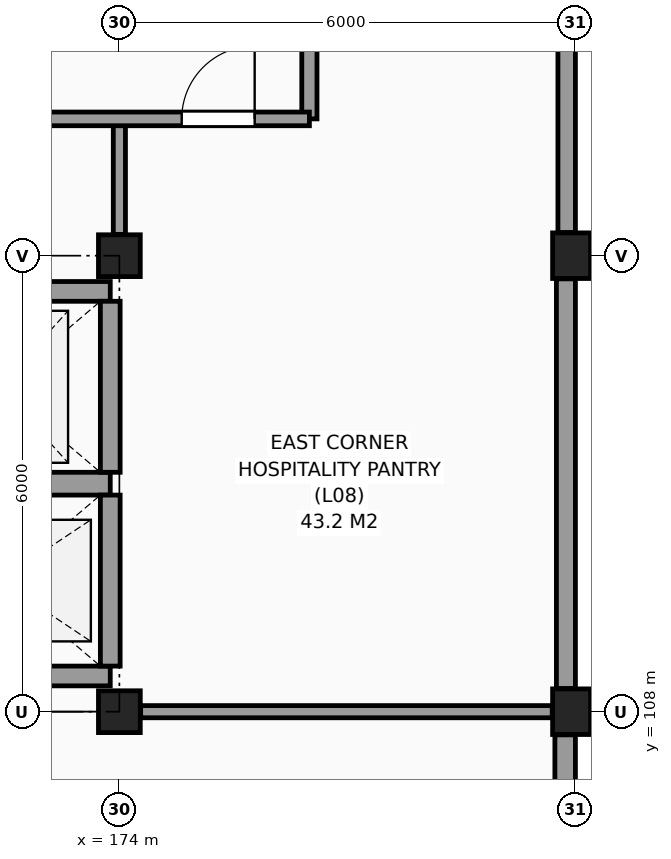
"""IFC4 building model, lengths in metres.
Left out: names, types, materials, properties, quantities, classifications, styles, units other than length and angle.
Written with IfcOpenShell. Run it as: python <this file> out.ifc"""

import sys

from ifc_helpers import new_model, si_unit, direction, frame, frame_2d, origin, origin_2d, place, context, subcontext, project, spatial, rectangle, extrude, element, fill, save


model = new_model("IFC4")
c1 = context("Model", 3, precision=1e-05, world=origin(), true_north=direction((0.0, 1.0)))
c2 = subcontext(c1, "Body", "Model", "MODEL_VIEW")
j1 = project(units=[si_unit("LENGTHUNIT", "METRE"), si_unit("PLANEANGLEUNIT", "RADIAN")], contexts=[c1])
p1 = place(None, origin())
s1 = spatial("IfcSite", under=j1, at=p1, CompositionType="ELEMENT")
p2 = place(p1, origin())
s2 = spatial("IfcBuilding", under=s1, at=p2, CompositionType="ELEMENT")
p3 = place(p2, frame((0.0, 0.0, 34.8)))
s3 = spatial("IfcBuildingStorey", under=s2, at=p3, CompositionType="ELEMENT", Elevation=34.8)
for number, where, z_axis, x_axis in (
    (1, (174.0, 108.0, 0.0), (0.0, 0.0, 1.0), (1.0, 0.0, 0.0)),
    (2, (174.0, 114.0, 0.0), (0.0, 0.0, 1.0), (1.0, 0.0, 0.0)),
):
    element("IfcColumn", number, at=place(p3, frame(where, z_axis=z_axis, x_axis=x_axis)), inside=s3, PredefinedType="COLUMN", context=c2, shape_type="SweptSolid", body=[
        extrude(rectangle(XDim=0.55, YDim=0.55, at=origin_2d()), origin(), (0.0, 0.0, 1.0), 3.3),
    ])
for number, where, z_axis, x_axis in (
    (3, (180.0, 108.0, 0.0), (0.0, 0.0, 1.0), (1.0, 0.0, 0.0)),
    (4, (180.0, 114.0, 0.0), (0.0, 0.0, 1.0), (1.0, 0.0, 0.0)),
):
    element("IfcColumn", number, at=place(p3, frame(where, z_axis=z_axis, x_axis=x_axis)), inside=s3, PredefinedType="COLUMN", context=c2, shape_type="SweptSolid", body=[
        extrude(rectangle(XDim=0.6, YDim=0.6, at=origin_2d()), origin(), (0.0, 0.0, 1.0), 3.3),
    ])
p4 = place(p3, frame((179.865, 102.305, 0.0), z_axis=(0.0, 0.0, 1.0), x_axis=(0.0, 1.0, 0.0)))
e5 = element("IfcWall", 5, at=p4, inside=s3, PredefinedType="SOLIDWALL", context=c2, shape_type="SweptSolid", body=[
    extrude(rectangle(XDim=5.39, YDim=0.27, at=frame_2d((2.695, 0.0))), origin(), (0.0, 0.0, 1.0), 2.42),
])
p5 = place(p4, frame((1.995, 0.0, 0.8)))
e6 = element("IfcOpeningElement", 6, at=p5, cuts=e5, PredefinedType="OPENING", context=c2, shape_type="SweptSolid", body=[
    extrude(rectangle(XDim=1.4, YDim=1.4, at=frame_2d((0.7, 0.7))), frame((0.0, 0.145, 0.0), z_axis=(0.0, -1.0, 0.0), x_axis=(1.0, 0.0, 0.0)), (0.0, 0.0, 1.0), 0.29),
])
p6 = place(p3, frame((179.875, 108.305, 0.0), z_axis=(0.0, 0.0, 1.0), x_axis=(0.0, 1.0, 0.0)))
e7 = element("IfcWall", 7, at=p6, inside=s3, PredefinedType="SOLIDWALL", context=c2, shape_type="SweptSolid", body=[
    extrude(rectangle(XDim=5.39, YDim=0.25, at=frame_2d((2.695, 0.0))), origin(), (0.0, 0.0, 1.0), 2.42),
])
p7 = place(p3, frame((179.885, 114.305, 0.0), z_axis=(0.0, 0.0, 1.0), x_axis=(0.0, 1.0, 0.0)))
e8 = element("IfcWall", 8, at=p7, inside=s3, PredefinedType="SOLIDWALL", context=c2, shape_type="SweptSolid", body=[
    extrude(rectangle(XDim=5.39, YDim=0.23, at=frame_2d((2.695, 0.0))), origin(), (0.0, 0.0, 1.0), 2.42),
])
p8 = place(p3, frame((170.97, 108.47, 0.0), z_axis=(0.0, 0.0, 1.0), x_axis=(1.0, 0.0, 0.0)))
e9 = element("IfcWall", 9, at=p8, inside=s3, PredefinedType="SHEAR", context=c2, shape_type="SweptSolid", body=[
    extrude(rectangle(XDim=2.91, YDim=0.26, at=frame_2d((1.455, 0.0))), origin(), (0.0, 0.0, 1.0), 3.3),
])
p9 = place(p3, frame((170.97, 111.0, 0.0), z_axis=(0.0, 0.0, 1.0), x_axis=(1.0, 0.0, 0.0)))
e10 = element("IfcWall", 10, at=p9, inside=s3, PredefinedType="SHEAR", context=c2, shape_type="SweptSolid", body=[
    extrude(rectangle(XDim=2.91, YDim=0.3, at=frame_2d((1.455, 0.0))), origin(), (0.0, 0.0, 1.0), 3.3),
])
p10 = place(p3, frame((173.88, 108.6, 0.0), z_axis=(0.0, 0.0, 1.0), x_axis=(0.0, 1.0, 0.0)))
e11 = element("IfcWall", 11, at=p10, inside=s3, PredefinedType="SHEAR", context=c2, shape_type="SweptSolid", body=[
    extrude(rectangle(XDim=2.25, YDim=0.26, at=frame_2d((1.125, 0.0))), origin(), (0.0, 0.0, 1.0), 3.3),
])
p11 = place(p3, frame((170.97, 113.53, 0.0), z_axis=(0.0, 0.0, 1.0), x_axis=(1.0, 0.0, 0.0)))
e12 = element("IfcWall", 12, at=p11, inside=s3, PredefinedType="SHEAR", context=c2, shape_type="SweptSolid", body=[
    extrude(rectangle(XDim=2.91, YDim=0.26, at=frame_2d((1.455, 0.0))), origin(), (0.0, 0.0, 1.0), 3.3),
])
p12 = place(p3, frame((173.88, 111.15, 0.0), z_axis=(0.0, 0.0, 1.0), x_axis=(0.0, 1.0, 0.0)))
e13 = element("IfcWall", 13, at=p12, inside=s3, PredefinedType="SHEAR", context=c2, shape_type="SweptSolid", body=[
    extrude(rectangle(XDim=2.25, YDim=0.26, at=frame_2d((1.125, 0.0))), origin(), (0.0, 0.0, 1.0), 3.3),
])
p13 = place(p3, frame((174.0, 114.28, 0.0), z_axis=(0.0, 0.0, 1.0), x_axis=(0.0, 1.0, 0.0)))
e14 = element("IfcWall", 14, at=p13, inside=s3, PredefinedType="PARTITIONING", context=c2, shape_type="SweptSolid", body=[
    extrude(rectangle(XDim=1.52, YDim=0.16, at=frame_2d((0.76, 0.0))), origin(), (0.0, 0.0, 1.0), 2.57),
])
p14 = place(p3, frame((176.5, 115.8, 0.0), z_axis=(0.0, 0.0, 1.0), x_axis=(0.0, 1.0, 0.0)))
e15 = element("IfcWall", 15, at=p14, inside=s3, PredefinedType="PARTITIONING", context=c2, shape_type="SweptSolid", body=[
    extrude(rectangle(XDim=2.4, YDim=0.2, at=frame_2d((1.2, 0.0))), origin(), (0.0, 0.0, 1.0), 3.07),
])
p15 = place(p3, frame((174.28, 108.0, 0.0), z_axis=(0.0, 0.0, 1.0), x_axis=(1.0, 0.0, 0.0)))
e16 = element("IfcWall", 16, at=p15, inside=s3, PredefinedType="PARTITIONING", context=c2, shape_type="SweptSolid", body=[
    extrude(rectangle(XDim=5.415, YDim=0.16, at=frame_2d((2.708, 0.0))), origin(), (0.0, 0.0, 1.0), 2.62),
])
p16 = place(p3, frame((172.2, 115.8, 0.0), z_axis=(0.0, 0.0, 1.0), x_axis=(1.0, 0.0, 0.0)))
e17 = element("IfcWall", 17, at=p16, inside=s3, PredefinedType="PARTITIONING", context=c2, shape_type="SweptSolid", body=[
    extrude(rectangle(XDim=4.3, YDim=0.18, at=frame_2d((2.15, 0.0))), origin(), (0.0, 0.0, 1.0), 3.07),
])
p17 = place(p16, frame((2.62, 0.0, 0.0)))
e18 = element("IfcOpeningElement", 18, at=p17, cuts=e17, PredefinedType="OPENING", context=c2, shape_type="SweptSolid", body=[
    extrude(rectangle(XDim=0.96, YDim=2.15, at=frame_2d((0.48, 1.075))), frame((0.0, 0.1, 0.0), z_axis=(0.0, -1.0, 0.0), x_axis=(1.0, 0.0, 0.0)), (0.0, 0.0, 1.0), 0.2),
])
p18 = place(p17, origin())
e19 = element("IfcDoor", 19, at=p18, inside=s3, OperationType="SINGLE_SWING_RIGHT", PredefinedType="DOOR", context=c2, shape_type="SweptSolid", body=[
    extrude(rectangle(XDim=0.96, YDim=2.15, at=frame_2d((0.48, 1.075))), frame((0.0, 0.025, 0.0), z_axis=(0.0, -1.0, 0.0), x_axis=(1.0, 0.0, 0.0)), (0.0, 0.0, 1.0), 0.05),
])
fill(e18, e19)
save(model, sys.argv[1])
